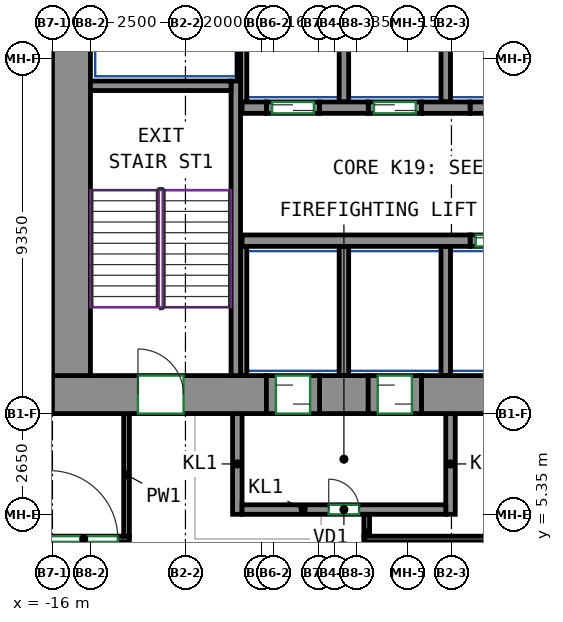
"""IFC4 building model, lengths in metres.
Left out: names, types, materials, properties, quantities, classifications, styles, units other than length and angle.
Written with IfcOpenShell. Run it as: python <this file> out.ifc"""

import sys

from ifc_helpers import new_model, si_unit, direction, frame, frame_2d, origin, place, context, subcontext, project, spatial, rectangle, extrude, source, transform, mapped, element, fill, save


model = new_model("IFC4")
c1 = context("Model", 3, precision=1e-05, world=origin(), true_north=direction((0.0, 1.0)))
c2 = subcontext(c1, "Body", "Model", "MODEL_VIEW")
j1 = project(units=[si_unit("LENGTHUNIT", "METRE"), si_unit("PLANEANGLEUNIT", "RADIAN")], contexts=[c1])
p1 = place(None, origin())
s1 = spatial("IfcSite", under=j1, at=p1, CompositionType="ELEMENT")
p2 = place(p1, origin())
s2 = spatial("IfcBuilding", under=s1, at=p2, CompositionType="ELEMENT")
p3 = place(p2, frame((0.0, 0.0, 79.2)))
s3 = spatial("IfcBuildingStorey", under=s2, at=p3, CompositionType="ELEMENT", Elevation=79.2)
m1 = source(origin(), c2, "Body", "SweptSolid", [
    extrude(rectangle(XDim=5.63, YDim=1.0, at=frame_2d((2.815, 0.0))), origin(), (0.0, 0.0, 1.0), 3.72),
])
p4 = place(p3, frame((-16.0, 8.5, 0.0), z_axis=(0.0, 0.0, 1.0), x_axis=(1.0, 0.0, 0.0)))
e1 = element("IfcWall", 1, at=p4, inside=s3, PredefinedType="SHEAR", context=c2, shape_type="MappedRepresentation", body=[
    mapped(m1, transform((0.0, 0.0, 0.0))),
])
p5 = place(p4, frame((2.25, 0.0, 0.0)))
e2 = element("IfcOpeningElement", 2, at=p5, cuts=e1, PredefinedType="OPENING", context=c2, shape_type="SweptSolid", body=[
    extrude(rectangle(XDim=1.2, YDim=2.1, at=frame_2d((0.6, 1.05))), frame((0.0, 0.51, 0.0), z_axis=(0.0, -1.0, 0.0), x_axis=(1.0, 0.0, 0.0)), (0.0, 0.0, 1.0), 1.02),
])
m2 = source(origin(), c2, "Body", "SweptSolid", [
    extrude(rectangle(XDim=1.28, YDim=1.0, at=frame_2d((0.64, 0.0))), origin(), (0.0, 0.0, 1.0), 3.72),
])
p6 = place(p3, frame((-8.97, 8.5, 0.0), z_axis=(0.0, 0.0, 1.0), x_axis=(1.0, 0.0, 0.0)))
e3 = element("IfcWall", 3, at=p6, inside=s3, PredefinedType="SHEAR", context=c2, shape_type="MappedRepresentation", body=[
    mapped(m2, transform((0.0, 0.0, 0.0))),
])
m3 = source(origin(), c2, "Body", "SweptSolid", [
    extrude(rectangle(XDim=14.18, YDim=1.0, at=frame_2d((7.09, 0.0))), origin(), (0.0, 0.0, 1.0), 3.72),
])
p7 = place(p3, frame((-6.29, 8.5, 0.0), z_axis=(0.0, 0.0, 1.0), x_axis=(1.0, 0.0, 0.0)))
e4 = element("IfcWall", 4, at=p7, inside=s3, PredefinedType="SHEAR", context=c2, shape_type="MappedRepresentation", body=[
    mapped(m3, transform((0.0, 0.0, 0.0))),
])
m4 = source(origin(), c2, "Body", "SweptSolid", [
    extrude(rectangle(XDim=12.0, YDim=1.0, at=frame_2d((6.0, 0.0))), origin(), (0.0, 0.0, 1.0), 3.72),
])
p8 = place(p3, frame((-15.5, 9.0, 0.0), z_axis=(0.0, 0.0, 1.0), x_axis=(0.0, 1.0, 0.0)))
e5 = element("IfcWall", 5, at=p8, inside=s3, PredefinedType="SHEAR", context=c2, shape_type="MappedRepresentation", body=[
    mapped(m4, transform((0.0, 0.0, 0.0))),
])
m5 = source(origin(), c2, "Body", "SweptSolid", [
    extrude(rectangle(XDim=7.75, YDim=0.25, at=frame_2d((3.875, 0.0))), origin(), (0.0, 0.0, 1.0), 3.72),
])
p9 = place(p3, frame((-11.175, 9.0, 0.0), z_axis=(0.0, 0.0, 1.0), x_axis=(0.0, 1.0, 0.0)))
e6 = element("IfcWall", 6, at=p9, inside=s3, PredefinedType="SHEAR", context=c2, shape_type="MappedRepresentation", body=[
    mapped(m5, transform((0.0, 0.0, 0.0))),
])
m6 = source(origin(), c2, "Body", "SweptSolid", [
    extrude(rectangle(XDim=3.7, YDim=0.25, at=frame_2d((1.85, 0.0))), origin(), (0.0, 0.0, 1.0), 3.72),
])
p10 = place(p3, frame((-15.0, 16.625, 0.0), z_axis=(0.0, 0.0, 1.0), x_axis=(1.0, 0.0, 0.0)))
e7 = element("IfcWall", 7, at=p10, inside=s3, PredefinedType="SHEAR", context=c2, shape_type="MappedRepresentation", body=[
    mapped(m6, transform((0.0, 0.0, 0.0))),
])
m7 = source(origin(), c2, "Body", "SweptSolid", [
    extrude(rectangle(XDim=6.0, YDim=0.3, at=frame_2d((3.0, 0.0))), origin(), (0.0, 0.0, 1.0), 3.72),
])
p11 = place(p3, frame((-11.01, 12.55, 0.0), z_axis=(0.0, 0.0, 1.0), x_axis=(1.0, 0.0, 0.0)))
e8 = element("IfcWall", 8, at=p11, inside=s3, PredefinedType="SHEAR", context=c2, shape_type="MappedRepresentation", body=[
    mapped(m7, transform((0.0, 0.0, 0.0))),
])
m8 = source(origin(), c2, "Body", "SweptSolid", [
    extrude(rectangle(XDim=0.64, YDim=0.3, at=frame_2d((0.32, 0.0))), origin(), (0.0, 0.0, 1.0), 3.72),
])
p12 = place(p3, frame((-11.01, 16.05, 0.0), z_axis=(0.0, 0.0, 1.0), x_axis=(1.0, 0.0, 0.0)))
e9 = element("IfcWall", 9, at=p12, inside=s3, PredefinedType="SHEAR", context=c2, shape_type="MappedRepresentation", body=[
    mapped(m8, transform((0.0, 0.0, 0.0))),
])
m9 = source(origin(), c2, "Body", "SweptSolid", [
    extrude(rectangle(XDim=1.28, YDim=0.3, at=frame_2d((0.64, 0.0))), origin(), (0.0, 0.0, 1.0), 3.72),
])
for number, where, z_axis, x_axis in (
    (10, (-8.97, 16.05, 0.0), (0.0, 0.0, 1.0), (1.0, 0.0, 0.0)),
    (11, (-6.29, 16.05, 0.0), (0.0, 0.0, 1.0), (1.0, 0.0, 0.0)),
):
    element("IfcWall", number, at=place(p3, frame(where, z_axis=z_axis, x_axis=x_axis)), inside=s3, PredefinedType="SHEAR", context=c2, shape_type="MappedRepresentation", body=[
        mapped(m9, transform((0.0, 0.0, 0.0))),
    ])
m10 = source(origin(), c2, "Body", "SweptSolid", [
    extrude(rectangle(XDim=1.4, YDim=0.3, at=frame_2d((0.7, 0.0))), origin(), (0.0, 0.0, 1.0), 3.72),
])
p13 = place(p3, frame((-5.01, 12.55, 0.0), z_axis=(0.0, 0.0, 1.0), x_axis=(1.0, 0.0, 0.0)))
e12 = element("IfcWall", 12, at=p13, inside=s3, PredefinedType="PARTITIONING", context=c2, shape_type="MappedRepresentation", body=[
    mapped(m10, transform((0.0, 0.0, 0.0))),
])
p14 = place(p13, frame((0.15, 0.0, 0.0)))
e13 = element("IfcOpeningElement", 13, at=p14, cuts=e12, PredefinedType="OPENING", context=c2, shape_type="SweptSolid", body=[
    extrude(rectangle(XDim=1.1, YDim=2.1, at=frame_2d((0.55, 1.05))), frame((0.0, 0.16, 0.0), z_axis=(0.0, -1.0, 0.0), x_axis=(1.0, 0.0, 0.0)), (0.0, 0.0, 1.0), 0.32),
])
m11 = source(origin(), c2, "Body", "SweptSolid", [
    extrude(rectangle(XDim=1.4, YDim=0.3, at=frame_2d((0.7, 0.0))), origin(), (0.0, 0.0, 1.0), 3.72),
])
p15 = place(p3, frame((-10.37, 16.05, 0.0), z_axis=(0.0, 0.0, 1.0), x_axis=(1.0, 0.0, 0.0)))
e14 = element("IfcWall", 14, at=p15, inside=s3, PredefinedType="PARTITIONING", context=c2, shape_type="MappedRepresentation", body=[
    mapped(m11, transform((0.0, 0.0, 0.0))),
])
p16 = place(p15, frame((0.15, 0.0, 0.0)))
e15 = element("IfcOpeningElement", 15, at=p16, cuts=e14, PredefinedType="OPENING", context=c2, shape_type="SweptSolid", body=[
    extrude(rectangle(XDim=1.1, YDim=2.1, at=frame_2d((0.55, 1.05))), frame((0.0, 0.16, 0.0), z_axis=(0.0, -1.0, 0.0), x_axis=(1.0, 0.0, 0.0)), (0.0, 0.0, 1.0), 0.32),
])
p17 = place(p3, frame((-7.69, 16.05, 0.0), z_axis=(0.0, 0.0, 1.0), x_axis=(1.0, 0.0, 0.0)))
e16 = element("IfcWall", 16, at=p17, inside=s3, PredefinedType="PARTITIONING", context=c2, shape_type="MappedRepresentation", body=[
    mapped(m10, transform((0.0, 0.0, 0.0))),
])
p18 = place(p17, frame((0.15, 0.0, 0.0)))
e17 = element("IfcOpeningElement", 17, at=p18, cuts=e16, PredefinedType="OPENING", context=c2, shape_type="SweptSolid", body=[
    extrude(rectangle(XDim=1.1, YDim=2.1, at=frame_2d((0.55, 1.05))), frame((0.0, 0.16, 0.0), z_axis=(0.0, -1.0, 0.0), x_axis=(1.0, 0.0, 0.0)), (0.0, 0.0, 1.0), 0.32),
])
p19 = place(p3, frame((-5.01, 16.05, 0.0), z_axis=(0.0, 0.0, 1.0), x_axis=(1.0, 0.0, 0.0)))
e18 = element("IfcWall", 18, at=p19, inside=s3, PredefinedType="PARTITIONING", context=c2, shape_type="MappedRepresentation", body=[
    mapped(m10, transform((0.0, 0.0, 0.0))),
])
m12 = source(origin(), c2, "Body", "SweptSolid", [
    extrude(rectangle(XDim=2.65, YDim=0.25, at=frame_2d((1.325, 0.0))), origin(), (0.0, 0.0, 1.0), 3.72),
])
for number, where, z_axis, x_axis in (
    (19, (-11.135, 5.35, 0.0), (0.0, 0.0, 1.0), (0.0, 1.0, 0.0)),
    (20, (-5.525, 5.35, 0.0), (0.0, 0.0, 1.0), (0.0, 1.0, 0.0)),
):
    element("IfcWall", number, at=place(p3, frame(where, z_axis=z_axis, x_axis=x_axis)), inside=s3, PredefinedType="PARTITIONING", context=c2, shape_type="MappedRepresentation", body=[
        mapped(m12, transform((0.0, 0.0, 0.0))),
    ])
m13 = source(origin(), c2, "Body", "SweptSolid", [
    extrude(rectangle(XDim=5.36, YDim=0.25, at=frame_2d((2.68, 0.0))), origin(), (0.0, 0.0, 1.0), 3.72),
])
p20 = place(p3, frame((-11.01, 5.475, 0.0), z_axis=(0.0, 0.0, 1.0), x_axis=(1.0, 0.0, 0.0)))
e21 = element("IfcWall", 21, at=p20, inside=s3, PredefinedType="PARTITIONING", context=c2, shape_type="MappedRepresentation", body=[
    mapped(m13, transform((0.0, 0.0, 0.0))),
])
p21 = place(p20, frame((2.28, 0.0, 0.0)))
e22 = element("IfcOpeningElement", 22, at=p21, cuts=e21, PredefinedType="OPENING", context=c2, shape_type="SweptSolid", body=[
    extrude(rectangle(XDim=0.8, YDim=2.0, at=frame_2d((0.4, 1.0))), frame((0.0, 0.135, 0.0), z_axis=(0.0, -1.0, 0.0), x_axis=(1.0, 0.0, 0.0)), (0.0, 0.0, 1.0), 0.27),
])
m14 = source(origin(), c2, "Body", "SweptSolid", [
    extrude(rectangle(XDim=3.275, YDim=0.165, at=frame_2d((1.638, 0.0))), origin(), (0.0, 0.0, 1.0), 3.72),
])
p22 = place(p3, frame((-10.968, 16.2, 0.0), z_axis=(0.0, 0.0, 1.0), x_axis=(0.0, 1.0, 0.0)))
e23 = element("IfcWall", 23, at=p22, inside=s3, PredefinedType="PARTITIONING", context=c2, shape_type="MappedRepresentation", body=[
    mapped(m14, transform((0.0, 0.0, 0.0))),
])
m15 = source(origin(), c2, "Body", "SweptSolid", [
    extrude(rectangle(XDim=2.725, YDim=0.085, at=frame_2d((1.363, 0.0))), origin(), (0.0, 0.0, 1.0), 3.72),
])
p23 = place(p3, frame((-11.093, 16.75, 0.0), z_axis=(0.0, 0.0, 1.0), x_axis=(0.0, 1.0, 0.0)))
e24 = element("IfcWall", 24, at=p23, inside=s3, PredefinedType="PARTITIONING", context=c2, shape_type="MappedRepresentation", body=[
    mapped(m15, transform((0.0, 0.0, 0.0))),
])
m16 = source(origin(), c2, "Body", "SweptSolid", [
    extrude(rectangle(XDim=3.275, YDim=0.25, at=frame_2d((1.638, 0.0))), origin(), (0.0, 0.0, 1.0), 3.72),
])
for number, where, z_axis, x_axis in (
    (25, (-5.65, 16.2, 0.0), (0.0, 0.0, 1.0), (0.0, 1.0, 0.0)),
    (26, (-8.33, 16.2, 0.0), (0.0, 0.0, 1.0), (0.0, 1.0, 0.0)),
):
    element("IfcWall", number, at=place(p3, frame(where, z_axis=z_axis, x_axis=x_axis)), inside=s3, PredefinedType="PARTITIONING", context=c2, shape_type="MappedRepresentation", body=[
        mapped(m16, transform((0.0, 0.0, 0.0))),
    ])
m17 = source(origin(), c2, "Body", "SweptSolid", [
    extrude(rectangle(XDim=3.4, YDim=0.165, at=frame_2d((1.7, 0.0))), origin(), (0.0, 0.0, 1.0), 3.72),
])
p24 = place(p3, frame((-10.968, 9.0, 0.0), z_axis=(0.0, 0.0, 1.0), x_axis=(0.0, 1.0, 0.0)))
e27 = element("IfcWall", 27, at=p24, inside=s3, PredefinedType="PARTITIONING", context=c2, shape_type="MappedRepresentation", body=[
    mapped(m17, transform((0.0, 0.0, 0.0))),
])
m18 = source(origin(), c2, "Body", "SweptSolid", [
    extrude(rectangle(XDim=3.4, YDim=0.25, at=frame_2d((1.7, 0.0))), origin(), (0.0, 0.0, 1.0), 3.72),
])
for number, where, z_axis, x_axis in (
    (28, (-5.65, 9.0, 0.0), (0.0, 0.0, 1.0), (0.0, 1.0, 0.0)),
    (29, (-8.33, 9.0, 0.0), (0.0, 0.0, 1.0), (0.0, 1.0, 0.0)),
):
    element("IfcWall", number, at=place(p3, frame(where, z_axis=z_axis, x_axis=x_axis)), inside=s3, PredefinedType="PARTITIONING", context=c2, shape_type="MappedRepresentation", body=[
        mapped(m18, transform((0.0, 0.0, 0.0))),
    ])
m19 = source(origin(), c2, "Body", "SweptSolid", [
    extrude(rectangle(XDim=1.4, YDim=1.0, at=frame_2d((0.7, 0.0))), origin(), (0.0, 0.0, 1.0), 2.7),
])
p25 = place(p3, frame((-10.37, 8.5, 0.0), z_axis=(0.0, 0.0, 1.0), x_axis=(1.0, 0.0, 0.0)))
e30 = element("IfcWall", 30, at=p25, inside=s3, PredefinedType="PARTITIONING", context=c2, shape_type="MappedRepresentation", body=[
    mapped(m19, transform((0.0, 0.0, 0.0))),
])
p26 = place(p25, frame((0.25, 0.0, 0.0)))
e31 = element("IfcOpeningElement", 31, at=p26, cuts=e30, PredefinedType="OPENING", context=c2, shape_type="SweptSolid", body=[
    extrude(rectangle(XDim=0.9, YDim=2.1, at=frame_2d((0.45, 1.05))), frame((0.0, 0.51, 0.0), z_axis=(0.0, -1.0, 0.0), x_axis=(1.0, 0.0, 0.0)), (0.0, 0.0, 1.0), 1.02),
])
m20 = source(origin(), c2, "Body", "SweptSolid", [
    extrude(rectangle(XDim=1.4, YDim=1.0, at=frame_2d((0.7, 0.0))), origin(), (0.0, 0.0, 1.0), 2.7),
])
p27 = place(p3, frame((-7.69, 8.5, 0.0), z_axis=(0.0, 0.0, 1.0), x_axis=(1.0, 0.0, 0.0)))
e32 = element("IfcWall", 32, at=p27, inside=s3, PredefinedType="PARTITIONING", context=c2, shape_type="MappedRepresentation", body=[
    mapped(m20, transform((0.0, 0.0, 0.0))),
])
p28 = place(p27, frame((0.25, 0.0, 0.0)))
e33 = element("IfcOpeningElement", 33, at=p28, cuts=e32, PredefinedType="OPENING", context=c2, shape_type="SweptSolid", body=[
    extrude(rectangle(XDim=0.9, YDim=2.1, at=frame_2d((0.45, 1.05))), frame((0.0, 0.51, 0.0), z_axis=(0.0, -1.0, 0.0), x_axis=(1.0, 0.0, 0.0)), (0.0, 0.0, 1.0), 1.02),
])
p29 = place(p3, frame((-19.325, 4.7, 0.0), z_axis=(0.0, 0.0, 1.0), x_axis=(1.0, 0.0, 0.0)))
e34 = element("IfcWall", 34, at=p29, inside=s3, PredefinedType="PARTITIONING", context=c2, shape_type="SweptSolid", body=[
    extrude(rectangle(XDim=5.35, YDim=0.15, at=frame_2d((2.675, 0.0))), origin(), (0.0, 0.0, 1.0), 3.72),
])
p30 = place(p29, frame((3.248, 0.0, 0.0)))
e35 = element("IfcOpeningElement", 35, at=p30, cuts=e34, PredefinedType="OPENING", context=c2, shape_type="SweptSolid", body=[
    extrude(rectangle(XDim=1.8, YDim=2.1, at=frame_2d((0.9, 1.05))), frame((0.0, 0.085, 0.0), z_axis=(0.0, -1.0, 0.0), x_axis=(1.0, 0.0, 0.0)), (0.0, 0.0, 1.0), 0.17),
])
p31 = place(p3, frame((-14.05, 8.0, 0.0), z_axis=(0.0, 0.0, 1.0), x_axis=(0.0, -1.0, 0.0)))
e36 = element("IfcWall", 36, at=p31, inside=s3, PredefinedType="PARTITIONING", context=c2, shape_type="SweptSolid", body=[
    extrude(rectangle(XDim=3.225, YDim=0.15, at=frame_2d((1.613, 0.0))), origin(), (0.0, 0.0, 1.0), 3.72),
])
p32 = place(p3, frame((-7.73, 4.775, 0.0), z_axis=(0.0, 0.0, 1.0), x_axis=(0.0, 1.0, 0.0)))
e37 = element("IfcWall", 37, at=p32, inside=s3, PredefinedType="PARTITIONING", context=c2, shape_type="SweptSolid", body=[
    extrude(rectangle(XDim=0.575, YDim=0.15, at=frame_2d((0.288, 0.0))), origin(), (0.0, 0.0, 1.0), 3.72),
])
p33 = place(p3, frame((-7.805, 4.7, 0.0), z_axis=(0.0, 0.0, 1.0), x_axis=(1.0, 0.0, 0.0)))
e38 = element("IfcWall", 38, at=p33, inside=s3, PredefinedType="PARTITIONING", context=c2, shape_type="SweptSolid", body=[
    extrude(rectangle(XDim=15.97, YDim=0.15, at=frame_2d((7.985, 0.0))), origin(), (0.0, 0.0, 1.0), 3.72),
])
p34 = place(p33, frame((8.439, 0.0, 0.0)))
e39 = element("IfcOpeningElement", 39, at=p34, cuts=e38, PredefinedType="OPENING", context=c2, shape_type="SweptSolid", body=[
    extrude(rectangle(XDim=0.9, YDim=2.1, at=frame_2d((0.45, 1.05))), frame((0.0, 0.085, 0.0), z_axis=(0.0, -1.0, 0.0), x_axis=(1.0, 0.0, 0.0)), (0.0, 0.0, 1.0), 0.17),
])
p35 = place(p21, origin())
e40 = element("IfcDoor", 40, at=p35, inside=s3, OperationType="SINGLE_SWING_LEFT", PredefinedType="DOOR", context=c2, shape_type="SweptSolid", body=[
    extrude(rectangle(XDim=0.8, YDim=2.0, at=frame_2d((0.4, 1.0))), frame((0.0, 0.025, 0.0), z_axis=(0.0, -1.0, 0.0), x_axis=(1.0, 0.0, 0.0)), (0.0, 0.0, 1.0), 0.05),
])
fill(e22, e40)
p36 = place(p26, origin())
e41 = element("IfcDoor", 41, at=p36, inside=s3, OperationType="SLIDING_TO_LEFT", PredefinedType="DOOR", context=c2, shape_type="SweptSolid", body=[
    extrude(rectangle(XDim=0.9, YDim=2.1, at=frame_2d((0.45, 1.05))), frame((0.0, 0.405, 0.0), z_axis=(0.0, -1.0, 0.0), x_axis=(1.0, 0.0, 0.0)), (0.0, 0.0, 1.0), 0.05),
])
fill(e31, e41)
p37 = place(p28, origin())
e42 = element("IfcDoor", 42, at=p37, inside=s3, OperationType="SLIDING_TO_RIGHT", PredefinedType="DOOR", context=c2, shape_type="SweptSolid", body=[
    extrude(rectangle(XDim=0.9, YDim=2.1, at=frame_2d((0.45, 1.05))), frame((0.0, 0.405, 0.0), z_axis=(0.0, -1.0, 0.0), x_axis=(1.0, 0.0, 0.0)), (0.0, 0.0, 1.0), 0.05),
])
fill(e33, e42)
p38 = place(p14, origin())
e43 = element("IfcDoor", 43, at=p38, inside=s3, OperationType="DOUBLE_DOOR_SLIDING", PredefinedType="DOOR", context=c2, shape_type="SweptSolid", body=[
    extrude(rectangle(XDim=1.1, YDim=2.1, at=frame_2d((0.55, 1.05))), frame((0.0, 0.025, 0.0), z_axis=(0.0, -1.0, 0.0), x_axis=(1.0, 0.0, 0.0)), (0.0, 0.0, 1.0), 0.05),
])
fill(e13, e43)
p39 = place(p16, origin())
e44 = element("IfcDoor", 44, at=p39, inside=s3, OperationType="DOUBLE_DOOR_SLIDING", PredefinedType="DOOR", context=c2, shape_type="SweptSolid", body=[
    extrude(rectangle(XDim=1.1, YDim=2.1, at=frame_2d((0.55, 1.05))), frame((0.0, 0.025, 0.0), z_axis=(0.0, -1.0, 0.0), x_axis=(1.0, 0.0, 0.0)), (0.0, 0.0, 1.0), 0.05),
])
fill(e15, e44)
p40 = place(p18, origin())
e45 = element("IfcDoor", 45, at=p40, inside=s3, OperationType="DOUBLE_DOOR_SLIDING", PredefinedType="DOOR", context=c2, shape_type="SweptSolid", body=[
    extrude(rectangle(XDim=1.1, YDim=2.1, at=frame_2d((0.55, 1.05))), frame((0.0, 0.025, 0.0), z_axis=(0.0, -1.0, 0.0), x_axis=(1.0, 0.0, 0.0)), (0.0, 0.0, 1.0), 0.05),
])
fill(e17, e45)
p41 = place(p5, origin())
e46 = element("IfcDoor", 46, at=p41, inside=s3, OperationType="DOUBLE_DOOR_SINGLE_SWING", PredefinedType="DOOR", context=c2, shape_type="SweptSolid", body=[
    extrude(rectangle(XDim=1.2, YDim=2.1, at=frame_2d((0.6, 1.05))), frame((0.0, 0.405, 0.0), z_axis=(0.0, -1.0, 0.0), x_axis=(1.0, 0.0, 0.0)), (0.0, 0.0, 1.0), 0.05),
])
fill(e2, e46)
p42 = place(p30, origin())
e47 = element("IfcDoor", 47, at=p42, inside=s3, OperationType="DOUBLE_DOOR_SINGLE_SWING", PredefinedType="DOOR", context=c2, shape_type="SweptSolid", body=[
    extrude(rectangle(XDim=1.8, YDim=2.1, at=frame_2d((0.9, 1.05))), frame((0.0, 0.025, 0.0), z_axis=(0.0, -1.0, 0.0), x_axis=(1.0, 0.0, 0.0)), (0.0, 0.0, 1.0), 0.05),
])
fill(e35, e47)
save(model, sys.argv[1])
